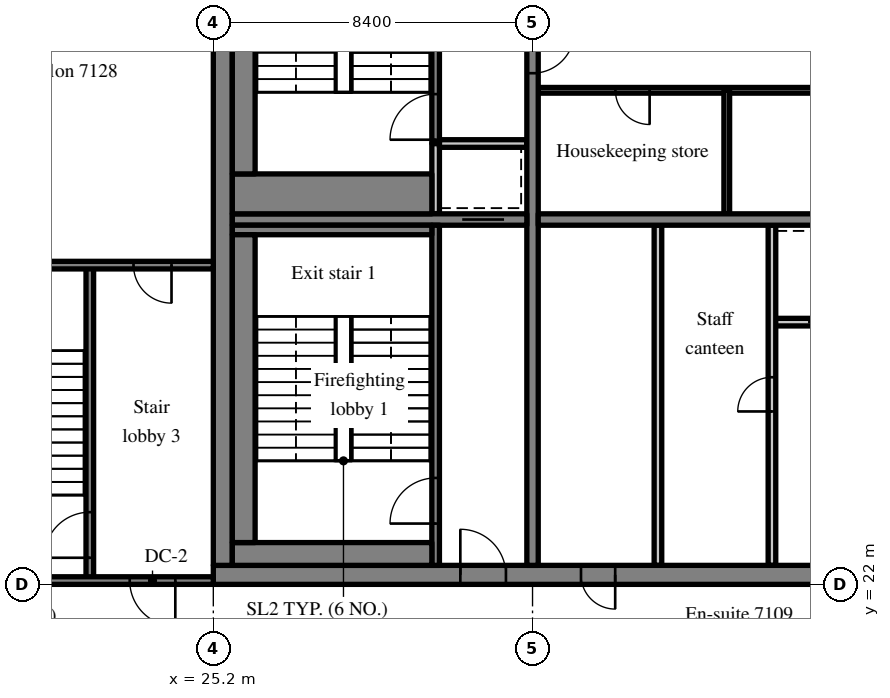
"""IFC4 building model, lengths in metres.
Left out: names, types, materials, properties, quantities, classifications, styles, units other than length and angle.
Written with IfcOpenShell. Run it as: python <this file> out.ifc"""

import sys

from ifc_helpers import new_model, si_unit, direction, frame, frame_2d, origin, place, context, subcontext, project, spatial, rectangle, extrude, source, transform, mapped, element, fill, save


model = new_model("IFC4")
c1 = context("Model", 3, precision=1e-05, world=origin(), true_north=direction((0.0, 1.0)))
c2 = subcontext(c1, "Body", "Model", "MODEL_VIEW")
j1 = project(units=[si_unit("LENGTHUNIT", "METRE"), si_unit("PLANEANGLEUNIT", "RADIAN")], contexts=[c1])
p1 = place(None, origin())
s1 = spatial("IfcSite", under=j1, at=p1, CompositionType="ELEMENT")
p2 = place(p1, origin())
s2 = spatial("IfcBuilding", under=s1, at=p2, CompositionType="ELEMENT")
p3 = place(p2, frame((0.0, 0.0, 297.7)))
s3 = spatial("IfcBuildingStorey", under=s2, at=p3, CompositionType="ELEMENT", Elevation=297.7)
m1 = source(origin(), c2, "Body", "SweptSolid", [
    extrude(rectangle(XDim=50.4, YDim=0.5, at=frame_2d((25.2, 0.0))), origin(), (0.0, 0.0, 1.0), 3.72),
])
p4 = place(p3, frame((25.2, 22.25, 0.0), z_axis=(0.0, 0.0, 1.0), x_axis=(1.0, 0.0, 0.0)))
e1 = element("IfcWall", 1, at=p4, inside=s3, PredefinedType="SHEAR", context=c2, shape_type="MappedRepresentation", body=[
    mapped(m1, transform((0.0, 0.0, 0.0), scale=1.0)),
])
m2 = source(origin(), c2, "Body", "SweptSolid", [
    extrude(rectangle(XDim=1.8, YDim=2.1, at=frame_2d((0.9, 1.05))), frame((0.0, 0.26, 0.0), z_axis=(0.0, -1.0, 0.0), x_axis=(1.0, 0.0, 0.0)), (0.0, 0.0, 1.0), 0.52),
])
p5 = place(p4, frame((15.9, 0.0, 0.0)))
e2 = element("IfcOpeningElement", 2, at=p5, cuts=e1, PredefinedType="OPENING", context=c2, shape_type="MappedRepresentation", body=[
    mapped(m2, transform((0.0, 0.0, 0.0), scale=1.0)),
])
m3 = source(origin(), c2, "Body", "SweptSolid", [
    extrude(rectangle(XDim=0.9, YDim=2.1, at=frame_2d((0.45, 1.05))), frame((0.0, 0.26, 0.0), z_axis=(0.0, -1.0, 0.0), x_axis=(1.0, 0.0, 0.0)), (0.0, 0.0, 1.0), 0.52),
])
p6 = place(p4, frame((9.675, 0.0, 0.0)))
e3 = element("IfcOpeningElement", 3, at=p6, cuts=e1, PredefinedType="OPENING", context=c2, shape_type="MappedRepresentation", body=[
    mapped(m3, transform((0.0, 0.0, 0.0), scale=1.0)),
])
p7 = place(p4, frame((21.525, 0.0, 0.0)))
e4 = element("IfcOpeningElement", 4, at=p7, cuts=e1, PredefinedType="OPENING", context=c2, shape_type="MappedRepresentation", body=[
    mapped(m3, transform((0.0, 0.0, 0.0), scale=1.0)),
])
p8 = place(p4, frame((32.7, 0.0, 0.0)))
e5 = element("IfcOpeningElement", 5, at=p8, cuts=e1, PredefinedType="OPENING", context=c2, shape_type="MappedRepresentation", body=[
    mapped(m2, transform((0.0, 0.0, 0.0), scale=1.0)),
])
m4 = source(origin(), c2, "Body", "SweptSolid", [
    extrude(rectangle(XDim=1.2, YDim=2.1, at=frame_2d((0.6, 1.05))), frame((0.0, 0.26, 0.0), z_axis=(0.0, -1.0, 0.0), x_axis=(1.0, 0.0, 0.0)), (0.0, 0.0, 1.0), 0.52),
])
p9 = place(p4, frame((6.5, 0.0, 0.0)))
e6 = element("IfcOpeningElement", 6, at=p9, cuts=e1, PredefinedType="OPENING", context=c2, shape_type="MappedRepresentation", body=[
    mapped(m4, transform((0.0, 0.0, 0.0), scale=1.0)),
])
p10 = place(p4, frame((47.975, 0.0, 0.0)))
e7 = element("IfcOpeningElement", 7, at=p10, cuts=e1, PredefinedType="OPENING", context=c2, shape_type="MappedRepresentation", body=[
    mapped(m4, transform((0.0, 0.0, 0.0), scale=1.0)),
])
m5 = source(origin(), c2, "Body", "SweptSolid", [
    extrude(rectangle(XDim=19.0, YDim=0.5, at=frame_2d((9.5, 0.0))), origin(), (0.0, 0.0, 1.0), 3.72),
])
p11 = place(p3, frame((25.45, 22.5, 0.0), z_axis=(0.0, 0.0, 1.0), x_axis=(0.0, 1.0, 0.0)))
e8 = element("IfcWall", 8, at=p11, inside=s3, PredefinedType="SHEAR", context=c2, shape_type="MappedRepresentation", body=[
    mapped(m5, transform((0.0, 0.0, 0.0), scale=1.0)),
])
m6 = source(origin(), c2, "Body", "SweptSolid", [
    extrude(rectangle(XDim=19.0, YDim=0.3, at=frame_2d((9.5, 0.0))), origin(), (0.0, 0.0, 1.0), 3.72),
])
p12 = place(p3, frame((33.6, 22.5, 0.0), z_axis=(0.0, 0.0, 1.0), x_axis=(0.0, 1.0, 0.0)))
e9 = element("IfcWall", 9, at=p12, inside=s3, PredefinedType="SHEAR", context=c2, shape_type="MappedRepresentation", body=[
    mapped(m6, transform((0.0, 0.0, 0.0), scale=1.0)),
])
m7 = source(origin(), c2, "Body", "SweptSolid", [
    extrude(rectangle(XDim=1.1, YDim=2.1, at=frame_2d((0.55, 1.05))), frame((0.0, 0.16, 0.0), z_axis=(0.0, -1.0, 0.0), x_axis=(1.0, 0.0, 0.0)), (0.0, 0.0, 1.0), 0.32),
])
p13 = place(p12, frame((12.95, 0.0, 0.0)))
e10 = element("IfcOpeningElement", 10, at=p13, cuts=e9, PredefinedType="OPENING", context=c2, shape_type="MappedRepresentation", body=[
    mapped(m7, transform((0.0, 0.0, 0.0), scale=1.0)),
])
m8 = source(origin(), c2, "Body", "SweptSolid", [
    extrude(rectangle(XDim=7.75, YDim=0.3, at=frame_2d((3.875, 0.0))), origin(), (0.0, 0.0, 1.0), 3.72),
])
p14 = place(p3, frame((25.7, 31.6, 0.0), z_axis=(0.0, 0.0, 1.0), x_axis=(1.0, 0.0, 0.0)))
e11 = element("IfcWall", 11, at=p14, inside=s3, PredefinedType="SHEAR", context=c2, shape_type="MappedRepresentation", body=[
    mapped(m8, transform((0.0, 0.0, 0.0), scale=1.0)),
])
p15 = place(p14, frame((6.05, 0.0, 0.0)))
e12 = element("IfcOpeningElement", 12, at=p15, cuts=e11, PredefinedType="OPENING", context=c2, shape_type="MappedRepresentation", body=[
    mapped(m7, transform((0.0, 0.0, 0.0), scale=1.0)),
])
m9 = source(origin(), c2, "Body", "SweptSolid", [
    extrude(rectangle(XDim=16.5, YDim=0.3, at=frame_2d((8.25, 0.0))), origin(), (0.0, 0.0, 1.0), 3.72),
])
p16 = place(p3, frame((33.75, 31.6, 0.0), z_axis=(0.0, 0.0, 1.0), x_axis=(1.0, 0.0, 0.0)))
e13 = element("IfcWall", 13, at=p16, inside=s3, PredefinedType="SHEAR", context=c2, shape_type="MappedRepresentation", body=[
    mapped(m9, transform((0.0, 0.0, 0.0), scale=1.0)),
])
m10 = source(origin(), c2, "Body", "SweptSolid", [
    extrude(rectangle(XDim=1.0, YDim=2.1, at=frame_2d((0.5, 1.05))), frame((0.0, 0.16, 0.0), z_axis=(0.0, -1.0, 0.0), x_axis=(1.0, 0.0, 0.0)), (0.0, 0.0, 1.0), 0.32),
])
p17 = place(p16, frame((14.875, 0.0, 0.0)))
e14 = element("IfcOpeningElement", 14, at=p17, cuts=e13, PredefinedType="OPENING", context=c2, shape_type="MappedRepresentation", body=[
    mapped(m10, transform((0.0, 0.0, 0.0), scale=1.0)),
])
m11 = source(origin(), c2, "Body", "SweptSolid", [
    extrude(rectangle(XDim=6.0, YDim=0.2, at=frame_2d((3.0, 0.0))), origin(), (0.0, 0.0, 1.0), 3.72),
])
p18 = place(p3, frame((39.9, 28.9, 0.0), z_axis=(0.0, 0.0, 1.0), x_axis=(1.0, 0.0, 0.0)))
e15 = element("IfcWall", 15, at=p18, inside=s3, PredefinedType="SOLIDWALL", context=c2, shape_type="MappedRepresentation", body=[
    mapped(m11, transform((0.0, 0.0, 0.0), scale=1.0)),
])
m12 = source(origin(), c2, "Body", "SweptSolid", [
    extrude(rectangle(XDim=1.1, YDim=2.1, at=frame_2d((0.55, 1.05))), frame((0.0, 0.11, 0.0), z_axis=(0.0, -1.0, 0.0), x_axis=(1.0, 0.0, 0.0)), (0.0, 0.0, 1.0), 0.22),
])
p19 = place(p18, frame((0.95, 0.0, 0.0)))
e16 = element("IfcOpeningElement", 16, at=p19, cuts=e15, PredefinedType="OPENING", context=c2, shape_type="MappedRepresentation", body=[
    mapped(m12, transform((0.0, 0.0, 0.0), scale=1.0)),
])
p20 = place(p18, frame((3.95, 0.0, 0.0)))
e17 = element("IfcOpeningElement", 17, at=p20, cuts=e15, PredefinedType="OPENING", context=c2, shape_type="MappedRepresentation", body=[
    mapped(m12, transform((0.0, 0.0, 0.0), scale=1.0)),
])
m13 = source(origin(), c2, "Body", "SweptSolid", [
    extrude(rectangle(XDim=8.95, YDim=0.2, at=frame_2d((4.475, 0.0))), origin(), (0.0, 0.0, 1.0), 3.72),
])
p21 = place(p3, frame((39.9, 22.5, 0.0), z_axis=(0.0, 0.0, 1.0), x_axis=(0.0, 1.0, 0.0)))
e18 = element("IfcWall", 18, at=p21, inside=s3, PredefinedType="PARTITIONING", context=c2, shape_type="MappedRepresentation", body=[
    mapped(m13, transform((0.0, 0.0, 0.0), scale=1.0)),
])
m14 = source(origin(), c2, "Body", "SweptSolid", [
    extrude(rectangle(XDim=0.9, YDim=2.1, at=frame_2d((0.45, 1.05))), frame((0.0, 0.11, 0.0), z_axis=(0.0, -1.0, 0.0), x_axis=(1.0, 0.0, 0.0)), (0.0, 0.0, 1.0), 0.22),
])
p22 = place(p21, frame((4.05, 0.0, 0.0)))
e19 = element("IfcOpeningElement", 19, at=p22, cuts=e18, PredefinedType="OPENING", context=c2, shape_type="MappedRepresentation", body=[
    mapped(m14, transform((0.0, 0.0, 0.0), scale=1.0)),
])
p23 = place(p3, frame((36.9, 22.5, 0.0), z_axis=(0.0, 0.0, 1.0), x_axis=(0.0, 1.0, 0.0)))
e20 = element("IfcWall", 20, at=p23, inside=s3, PredefinedType="PARTITIONING", context=c2, shape_type="MappedRepresentation", body=[
    mapped(m13, transform((0.0, 0.0, 0.0), scale=1.0)),
])
m15 = source(origin(), c2, "Body", "SweptSolid", [
    extrude(rectangle(XDim=14.25, YDim=0.15, at=frame_2d((7.125, 0.0))), origin(), (0.0, 0.0, 1.0), 3.72),
])
p24 = place(p3, frame((33.75, 35.0, 0.0), z_axis=(0.0, 0.0, 1.0), x_axis=(1.0, 0.0, 0.0)))
e21 = element("IfcWall", 21, at=p24, inside=s3, PredefinedType="PARTITIONING", context=c2, shape_type="MappedRepresentation", body=[
    mapped(m15, transform((0.0, 0.0, 0.0), scale=1.0)),
])
m16 = source(origin(), c2, "Body", "SweptSolid", [
    extrude(rectangle(XDim=0.9, YDim=2.1, at=frame_2d((0.45, 1.05))), frame((0.0, 0.085, 0.0), z_axis=(0.0, -1.0, 0.0), x_axis=(1.0, 0.0, 0.0)), (0.0, 0.0, 1.0), 0.17),
])
p25 = place(p24, frame((2.031, 0.0, 0.0)))
e22 = element("IfcOpeningElement", 22, at=p25, cuts=e21, PredefinedType="OPENING", context=c2, shape_type="MappedRepresentation", body=[
    mapped(m16, transform((0.0, 0.0, 0.0), scale=1.0)),
])
p26 = place(p24, frame((9.118, 0.0, 0.0)))
e23 = element("IfcOpeningElement", 23, at=p26, cuts=e21, PredefinedType="OPENING", context=c2, shape_type="MappedRepresentation", body=[
    mapped(m16, transform((0.0, 0.0, 0.0), scale=1.0)),
])
m17 = source(origin(), c2, "Body", "SweptSolid", [
    extrude(rectangle(XDim=3.25, YDim=0.15, at=frame_2d((1.625, 0.0))), origin(), (0.0, 0.0, 1.0), 3.72),
])
p27 = place(p3, frame((38.711, 31.75, 0.0), z_axis=(0.0, 0.0, 1.0), x_axis=(0.0, 1.0, 0.0)))
e24 = element("IfcWall", 24, at=p27, inside=s3, PredefinedType="PARTITIONING", context=c2, shape_type="MappedRepresentation", body=[
    mapped(m17, transform((0.0, 0.0, 0.0), scale=1.0)),
])
m18 = source(origin(), c2, "Body", "SweptSolid", [
    extrude(rectangle(XDim=8.95, YDim=0.2, at=frame_2d((4.475, 0.0))), origin(), (0.0, 0.0, 1.0), 3.72),
])
p28 = place(p3, frame((31.05, 22.5, 0.0), z_axis=(0.0, 0.0, 1.0), x_axis=(0.0, 1.0, 0.0)))
e25 = element("IfcWall", 25, at=p28, inside=s3, PredefinedType="SOLIDWALL", context=c2, shape_type="MappedRepresentation", body=[
    mapped(m18, transform((0.0, 0.0, 0.0), scale=1.0)),
])
m19 = source(origin(), c2, "Body", "SweptSolid", [
    extrude(rectangle(XDim=1.2, YDim=2.1, at=frame_2d((0.6, 1.05))), frame((0.0, 0.11, 0.0), z_axis=(0.0, -1.0, 0.0), x_axis=(1.0, 0.0, 0.0)), (0.0, 0.0, 1.0), 0.22),
])
p29 = place(p28, frame((1.1, 0.0, 0.0)))
e26 = element("IfcOpeningElement", 26, at=p29, cuts=e25, PredefinedType="OPENING", context=c2, shape_type="MappedRepresentation", body=[
    mapped(m19, transform((0.0, 0.0, 0.0), scale=1.0)),
])
m20 = source(origin(), c2, "Body", "SweptSolid", [
    extrude(rectangle(XDim=1.85, YDim=0.2, at=frame_2d((0.925, 0.0))), origin(), (0.0, 0.0, 1.0), 3.72),
])
p30 = place(p3, frame((31.05, 31.75, 0.0), z_axis=(0.0, 0.0, 1.0), x_axis=(0.0, 1.0, 0.0)))
e27 = element("IfcWall", 27, at=p30, inside=s3, PredefinedType="SOLIDWALL", context=c2, shape_type="MappedRepresentation", body=[
    mapped(m20, transform((0.0, 0.0, 0.0), scale=1.0)),
])
m21 = source(origin(), c2, "Body", "SweptSolid", [
    extrude(rectangle(XDim=2.3, YDim=0.2, at=frame_2d((1.15, 0.0))), origin(), (0.0, 0.0, 1.0), 3.72),
])
p31 = place(p3, frame((31.15, 33.6, 0.0), z_axis=(0.0, 0.0, 1.0), x_axis=(1.0, 0.0, 0.0)))
e28 = element("IfcWall", 28, at=p31, inside=s3, PredefinedType="SOLIDWALL", context=c2, shape_type="MappedRepresentation", body=[
    mapped(m21, transform((0.0, 0.0, 0.0), scale=1.0)),
])
m22 = source(origin(), c2, "Body", "SweptSolid", [
    extrude(rectangle(XDim=7.9, YDim=0.2, at=frame_2d((3.95, 0.0))), origin(), (0.0, 0.0, 1.0), 3.72),
])
p32 = place(p3, frame((31.05, 33.6, 0.0), z_axis=(0.0, 0.0, 1.0), x_axis=(0.0, 1.0, 0.0)))
e29 = element("IfcWall", 29, at=p32, inside=s3, PredefinedType="SOLIDWALL", context=c2, shape_type="MappedRepresentation", body=[
    mapped(m22, transform((0.0, 0.0, 0.0), scale=1.0)),
])
p33 = place(p32, frame((0.1, 0.0, 0.0)))
e30 = element("IfcOpeningElement", 30, at=p33, cuts=e29, PredefinedType="OPENING", context=c2, shape_type="MappedRepresentation", body=[
    mapped(m19, transform((0.0, 0.0, 0.0), scale=1.0)),
])
m23 = source(origin(), c2, "Body", "SweptSolid", [
    extrude(rectangle(XDim=8.3, YDim=0.2, at=frame_2d((4.15, 0.0))), origin(), (0.0, 0.0, 1.0), 3.72),
])
p34 = place(p3, frame((21.95, 22.1, 0.0), z_axis=(0.0, 0.0, 1.0), x_axis=(0.0, 1.0, 0.0)))
e31 = element("IfcWall", 31, at=p34, inside=s3, PredefinedType="SOLIDWALL", context=c2, shape_type="MappedRepresentation", body=[
    mapped(m23, transform((0.0, 0.0, 0.0), scale=1.0)),
])
p35 = place(p34, frame((0.6, 0.0, 0.0)))
e32 = element("IfcOpeningElement", 32, at=p35, cuts=e31, PredefinedType="OPENING", context=c2, shape_type="MappedRepresentation", body=[
    mapped(m19, transform((0.0, 0.0, 0.0), scale=1.0)),
])
m24 = source(origin(), c2, "Body", "SweptSolid", [
    extrude(rectangle(XDim=8.15, YDim=0.2, at=frame_2d((4.075, 0.0))), origin(), (0.0, 0.0, 1.0), 3.72),
])
p36 = place(p3, frame((17.05, 22.1, 0.0), z_axis=(0.0, 0.0, 1.0), x_axis=(1.0, 0.0, 0.0)))
e33 = element("IfcWall", 33, at=p36, inside=s3, PredefinedType="SOLIDWALL", context=c2, shape_type="MappedRepresentation", body=[
    mapped(m24, transform((0.0, 0.0, 0.0), scale=1.0)),
])
p37 = place(p36, frame((5.95, 0.0, 0.0)))
e34 = element("IfcOpeningElement", 34, at=p37, cuts=e33, PredefinedType="OPENING", context=c2, shape_type="MappedRepresentation", body=[
    mapped(m19, transform((0.0, 0.0, 0.0), scale=1.0)),
])
p38 = place(p3, frame((17.05, 30.4, 0.0), z_axis=(0.0, 0.0, 1.0), x_axis=(1.0, 0.0, 0.0)))
e35 = element("IfcWall", 35, at=p38, inside=s3, PredefinedType="SOLIDWALL", context=c2, shape_type="MappedRepresentation", body=[
    mapped(m24, transform((0.0, 0.0, 0.0), scale=1.0)),
])
m25 = source(origin(), c2, "Body", "SweptSolid", [
    extrude(rectangle(XDim=1.0, YDim=2.1, at=frame_2d((0.5, 1.05))), frame((0.0, 0.11, 0.0), z_axis=(0.0, -1.0, 0.0), x_axis=(1.0, 0.0, 0.0)), (0.0, 0.0, 1.0), 0.22),
])
p39 = place(p38, frame((6.05, 0.0, 0.0)))
e36 = element("IfcOpeningElement", 36, at=p39, cuts=e35, PredefinedType="OPENING", context=c2, shape_type="MappedRepresentation", body=[
    mapped(m25, transform((0.0, 0.0, 0.0), scale=1.0)),
])
m26 = source(origin(), c2, "Body", "SweptSolid", [
    extrude(rectangle(XDim=5.25, YDim=0.6, at=frame_2d((2.625, 0.0))), origin(), (0.0, 0.0, 1.0), 3.72),
])
p40 = place(p3, frame((25.7, 22.8, 0.0), z_axis=(0.0, 0.0, 1.0), x_axis=(1.0, 0.0, 0.0)))
e37 = element("IfcWall", 37, at=p40, inside=s3, PredefinedType="SOLIDWALL", context=c2, shape_type="MappedRepresentation", body=[
    mapped(m26, transform((0.0, 0.0, 0.0), scale=1.0)),
])
m27 = source(origin(), c2, "Body", "SweptSolid", [
    extrude(rectangle(XDim=5.25, YDim=0.25, at=frame_2d((2.625, 0.0))), origin(), (0.0, 0.0, 1.0), 3.72),
])
p41 = place(p3, frame((25.7, 31.325, 0.0), z_axis=(0.0, 0.0, 1.0), x_axis=(1.0, 0.0, 0.0)))
e38 = element("IfcWall", 38, at=p41, inside=s3, PredefinedType="SOLIDWALL", context=c2, shape_type="MappedRepresentation", body=[
    mapped(m27, transform((0.0, 0.0, 0.0), scale=1.0)),
])
m28 = source(origin(), c2, "Body", "SweptSolid", [
    extrude(rectangle(XDim=8.1, YDim=0.6, at=frame_2d((4.05, 0.0))), origin(), (0.0, 0.0, 1.0), 3.72),
])
p42 = place(p3, frame((26.0, 23.1, 0.0), z_axis=(0.0, 0.0, 1.0), x_axis=(0.0, 1.0, 0.0)))
e39 = element("IfcWall", 39, at=p42, inside=s3, PredefinedType="SOLIDWALL", context=c2, shape_type="MappedRepresentation", body=[
    mapped(m28, transform((0.0, 0.0, 0.0), scale=1.0)),
])
m29 = source(origin(), c2, "Body", "SweptSolid", [
    extrude(rectangle(XDim=5.25, YDim=1.05, at=frame_2d((2.625, 0.0))), origin(), (0.0, 0.0, 1.0), 3.72),
])
p43 = place(p3, frame((25.7, 32.275, 0.0), z_axis=(0.0, 0.0, 1.0), x_axis=(1.0, 0.0, 0.0)))
e40 = element("IfcWall", 40, at=p43, inside=s3, PredefinedType="SOLIDWALL", context=c2, shape_type="MappedRepresentation", body=[
    mapped(m29, transform((0.0, 0.0, 0.0), scale=1.0)),
])
p44 = place(p3, frame((26.0, 32.8, 0.0), z_axis=(0.0, 0.0, 1.0), x_axis=(0.0, 1.0, 0.0)))
e41 = element("IfcWall", 41, at=p44, inside=s3, PredefinedType="SOLIDWALL", context=c2, shape_type="MappedRepresentation", body=[
    mapped(m28, transform((0.0, 0.0, 0.0), scale=1.0)),
])
m30 = source(origin(), c2, "Body", "SweptSolid", [
    extrude(rectangle(XDim=1.1, YDim=2.1, at=frame_2d((0.55, 1.05))), frame((0.0, 0.025, 0.0), z_axis=(0.0, -1.0, 0.0), x_axis=(1.0, 0.0, 0.0)), (0.0, 0.0, 1.0), 0.05),
])
p45 = place(p19, origin())
e42 = element("IfcDoor", 42, at=p45, inside=s3, OperationType="SLIDING_TO_LEFT", PredefinedType="DOOR", context=c2, shape_type="MappedRepresentation", body=[
    mapped(m30, transform((0.0, 0.0, 0.0), scale=1.0)),
])
fill(e16, e42)
m31 = source(origin(), c2, "Body", "SweptSolid", [
    extrude(rectangle(XDim=0.9, YDim=2.1, at=frame_2d((0.45, 1.05))), frame((0.0, 0.175, 0.0), z_axis=(0.0, -1.0, 0.0), x_axis=(1.0, 0.0, 0.0)), (0.0, 0.0, 1.0), 0.05),
])
p46 = place(p6, origin())
e43 = element("IfcDoor", 43, at=p46, inside=s3, OperationType="SINGLE_SWING_RIGHT", PredefinedType="DOOR", context=c2, shape_type="MappedRepresentation", body=[
    mapped(m31, transform((0.0, 0.0, 0.0), scale=1.0)),
])
fill(e3, e43)
m32 = source(origin(), c2, "Body", "SweptSolid", [
    extrude(rectangle(XDim=0.9, YDim=2.1, at=frame_2d((0.45, 1.05))), frame((0.0, 0.025, 0.0), z_axis=(0.0, -1.0, 0.0), x_axis=(1.0, 0.0, 0.0)), (0.0, 0.0, 1.0), 0.05),
])
p47 = place(p22, origin())
e44 = element("IfcDoor", 44, at=p47, inside=s3, OperationType="SINGLE_SWING_LEFT", PredefinedType="DOOR", context=c2, shape_type="MappedRepresentation", body=[
    mapped(m32, transform((0.0, 0.0, 0.0), scale=1.0)),
])
fill(e19, e44)
p48 = place(p25, origin())
e45 = element("IfcDoor", 45, at=p48, inside=s3, OperationType="SINGLE_SWING_RIGHT", PredefinedType="DOOR", context=c2, shape_type="MappedRepresentation", body=[
    mapped(m32, transform((0.0, 0.0, 0.0), scale=1.0)),
])
fill(e22, e45)
m33 = source(origin(), c2, "Body", "SweptSolid", [
    extrude(rectangle(XDim=1.2, YDim=2.1, at=frame_2d((0.6, 1.05))), frame((0.0, 0.025, 0.0), z_axis=(0.0, -1.0, 0.0), x_axis=(1.0, 0.0, 0.0)), (0.0, 0.0, 1.0), 0.05),
])
p49 = place(p29, origin())
e46 = element("IfcDoor", 46, at=p49, inside=s3, OperationType="SINGLE_SWING_LEFT", PredefinedType="DOOR", context=c2, shape_type="MappedRepresentation", body=[
    mapped(m33, transform((0.0, 0.0, 0.0), scale=1.0)),
])
fill(e26, e46)
m34 = source(origin(), c2, "Body", "SweptSolid", [
    extrude(rectangle(XDim=1.2, YDim=2.1, at=frame_2d((0.6, 1.05))), frame((0.0, 0.175, 0.0), z_axis=(0.0, -1.0, 0.0), x_axis=(1.0, 0.0, 0.0)), (0.0, 0.0, 1.0), 0.05),
])
p50 = place(p9, origin())
e47 = element("IfcDoor", 47, at=p50, inside=s3, OperationType="SINGLE_SWING_LEFT", PredefinedType="DOOR", context=c2, shape_type="MappedRepresentation", body=[
    mapped(m34, transform((0.0, 0.0, 0.0), scale=1.0)),
])
fill(e6, e47)
p51 = place(p15, origin())
e48 = element("IfcDoor", 48, at=p51, inside=s3, OperationType="SLIDING_TO_LEFT", PredefinedType="DOOR", context=c2, shape_type="MappedRepresentation", body=[
    mapped(m30, transform((0.0, 0.0, 0.0), scale=1.0)),
])
fill(e12, e48)
p52 = place(p33, origin())
e49 = element("IfcDoor", 49, at=p52, inside=s3, OperationType="SINGLE_SWING_LEFT", PredefinedType="DOOR", context=c2, shape_type="MappedRepresentation", body=[
    mapped(m33, transform((0.0, 0.0, 0.0), scale=1.0)),
])
fill(e30, e49)
p53 = place(p35, origin())
e50 = element("IfcDoor", 50, at=p53, inside=s3, OperationType="SINGLE_SWING_LEFT", PredefinedType="DOOR", context=c2, shape_type="MappedRepresentation", body=[
    mapped(m33, transform((0.0, 0.0, 0.0), scale=1.0)),
])
fill(e32, e50)
p54 = place(p37, origin())
e51 = element("IfcDoor", 51, at=p54, inside=s3, OperationType="SINGLE_SWING_RIGHT", PredefinedType="DOOR", context=c2, shape_type="MappedRepresentation", body=[
    mapped(m33, transform((0.0, 0.0, 0.0), scale=1.0)),
])
fill(e34, e51)
m35 = source(origin(), c2, "Body", "SweptSolid", [
    extrude(rectangle(XDim=1.0, YDim=2.1, at=frame_2d((0.5, 1.05))), frame((0.0, 0.025, 0.0), z_axis=(0.0, -1.0, 0.0), x_axis=(1.0, 0.0, 0.0)), (0.0, 0.0, 1.0), 0.05),
])
p55 = place(p39, origin())
e52 = element("IfcDoor", 52, at=p55, inside=s3, OperationType="SINGLE_SWING_RIGHT", PredefinedType="DOOR", context=c2, shape_type="MappedRepresentation", body=[
    mapped(m35, transform((0.0, 0.0, 0.0), scale=1.0)),
])
fill(e36, e52)
p56 = place(p13, origin())
e53 = element("IfcDoor", 53, at=p56, inside=s3, OperationType="SINGLE_SWING_RIGHT", PredefinedType="DOOR", context=c2, shape_type="MappedRepresentation", body=[
    mapped(m30, transform((0.0, 0.0, 0.0), scale=1.0)),
])
fill(e10, e53)
save(model, sys.argv[1])
